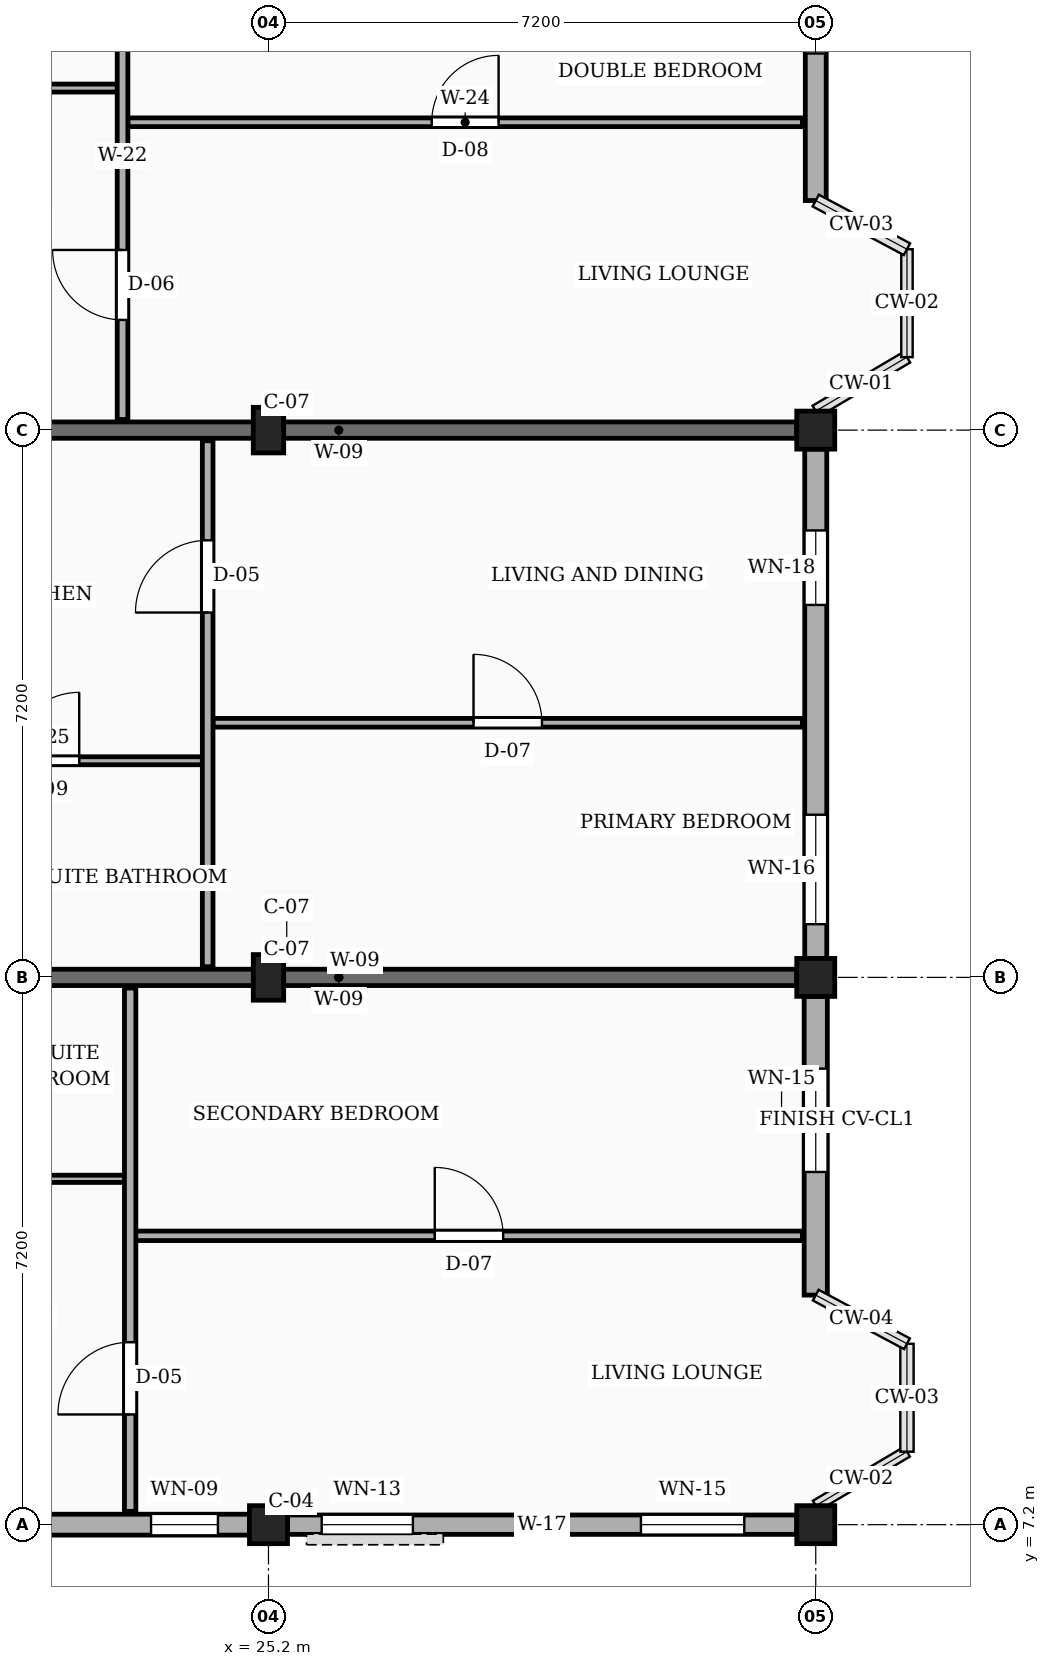
"""IFC4 building model, lengths in metres.
Left out: names, types, materials, properties, quantities, classifications, styles, units other than length and angle.
Written with IfcOpenShell. Run it as: python <this file> out.ifc"""

import sys

from ifc_helpers import new_model, si_unit, direction, frame, frame_2d, origin, origin_2d, place, context, subcontext, project, spatial, rectangle, extrude, element, fill, save


model = new_model("IFC4")
c1 = context("Model", 3, precision=1e-05, world=origin(), true_north=direction((0.0, 1.0)))
c2 = subcontext(c1, "Body", "Model", "MODEL_VIEW")
j1 = project(units=[si_unit("LENGTHUNIT", "METRE"), si_unit("PLANEANGLEUNIT", "RADIAN")], contexts=[c1])
p1 = place(None, origin())
s1 = spatial("IfcSite", under=j1, at=p1, CompositionType="ELEMENT")
p2 = place(p1, origin())
s2 = spatial("IfcBuilding", under=s1, at=p2, CompositionType="ELEMENT")
p3 = place(p2, frame((0.0, 0.0, 29.7)))
s3 = spatial("IfcBuildingStorey", under=s2, at=p3, CompositionType="ELEMENT", Elevation=29.7)
p4 = place(p3, frame((25.2, 7.2, 0.0), z_axis=(0.0, 0.0, 1.0), x_axis=(1.0, 0.0, 0.0)))
e1 = element("IfcColumn", 1, at=p4, inside=s3, PredefinedType="COLUMN", context=c2, shape_type="SweptSolid", body=[
    extrude(rectangle(XDim=0.5, YDim=0.5, at=origin_2d()), origin(), (0.0, 0.0, 1.0), 3.15),
])
for number, where, z_axis, x_axis in (
    (2, (25.2, 14.4, 0.0), (0.0, 0.0, 1.0), (1.0, 0.0, 0.0)),
    (3, (25.2, 21.6, 0.0), (0.0, 0.0, 1.0), (1.0, 0.0, 0.0)),
):
    element("IfcColumn", number, at=place(p3, frame(where, z_axis=z_axis, x_axis=x_axis)), inside=s3, PredefinedType="COLUMN", context=c2, shape_type="SweptSolid", body=[
        extrude(rectangle(XDim=0.4, YDim=0.6, at=origin_2d()), origin(), (0.0, 0.0, 1.0), 3.15),
    ])
for number, where, z_axis, x_axis in (
    (4, (32.4, 7.2, 0.0), (0.0, 0.0, 1.0), (1.0, 0.0, 0.0)),
    (5, (32.4, 14.4, 0.0), (0.0, 0.0, 1.0), (1.0, 0.0, 0.0)),
    (6, (32.4, 21.6, 0.0), (0.0, 0.0, 1.0), (1.0, 0.0, 0.0)),
):
    element("IfcColumn", number, at=place(p3, frame(where, z_axis=z_axis, x_axis=x_axis)), inside=s3, PredefinedType="COLUMN", context=c2, shape_type="SweptSolid", body=[
        extrude(rectangle(XDim=0.5, YDim=0.5, at=origin_2d()), origin(), (0.0, 0.0, 1.0), 3.15),
    ])
for number, where, z_axis, x_axis in (
    (7, (20.1, 14.4, 0.0), (0.0, 0.0, 1.0), (1.0, 0.0, 0.0)),
    (8, (20.1, 21.6, 0.0), (0.0, 0.0, 1.0), (1.0, 0.0, 0.0)),
):
    element("IfcWall", number, at=place(p3, frame(where, z_axis=z_axis, x_axis=x_axis)), inside=s3, PredefinedType="SOLIDWALL", context=c2, shape_type="SweptSolid", body=[
        extrude(rectangle(XDim=12.05, YDim=0.215, at=frame_2d((6.025, 0.0))), origin(), (0.0, 0.0, 1.0), 2.17),
    ])
p5 = place(p3, frame((18.25, 7.2, 0.0), z_axis=(0.0, 0.0, 1.0), x_axis=(1.0, 0.0, 0.0)))
e9 = element("IfcWall", 9, at=p5, inside=s3, PredefinedType="SOLIDWALL", context=c2, shape_type="SweptSolid", body=[
    extrude(rectangle(XDim=6.7, YDim=0.275, at=frame_2d((3.35, 0.0))), origin(), (0.0, 0.0, 1.0), 2.44),
])
p6 = place(p5, frame((0.515, 0.0, 0.78)))
e10 = element("IfcOpeningElement", 10, at=p6, cuts=e9, PredefinedType="OPENING", context=c2, shape_type="SweptSolid", body=[
    extrude(rectangle(XDim=0.96, YDim=1.26, at=frame_2d((0.48, 0.63))), frame((0.0, 0.147, 0.0), z_axis=(0.0, -1.0, 0.0), x_axis=(1.0, 0.0, 0.0)), (0.0, 0.0, 1.0), 0.295),
])
p7 = place(p5, frame((2.93, 0.0, 0.78)))
e11 = element("IfcOpeningElement", 11, at=p7, cuts=e9, PredefinedType="OPENING", context=c2, shape_type="SweptSolid", body=[
    extrude(rectangle(XDim=1.12, YDim=1.26, at=frame_2d((0.56, 0.63))), frame((0.0, 0.147, 0.0), z_axis=(0.0, -1.0, 0.0), x_axis=(1.0, 0.0, 0.0)), (0.0, 0.0, 1.0), 0.295),
])
p8 = place(p5, frame((5.405, 0.0, 0.78)))
e12 = element("IfcOpeningElement", 12, at=p8, cuts=e9, PredefinedType="OPENING", context=c2, shape_type="SweptSolid", body=[
    extrude(rectangle(XDim=0.88, YDim=1.26, at=frame_2d((0.44, 0.63))), frame((0.0, 0.147, 0.0), z_axis=(0.0, -1.0, 0.0), x_axis=(1.0, 0.0, 0.0)), (0.0, 0.0, 1.0), 0.295),
])
p9 = place(p3, frame((25.45, 7.2, 0.0), z_axis=(0.0, 0.0, 1.0), x_axis=(1.0, 0.0, 0.0)))
e13 = element("IfcWall", 13, at=p9, inside=s3, PredefinedType="SOLIDWALL", context=c2, shape_type="SweptSolid", body=[
    extrude(rectangle(XDim=6.7, YDim=0.255, at=frame_2d((3.35, 0.0))), origin(), (0.0, 0.0, 1.0), 2.44),
])
p10 = place(p9, frame((0.45, 0.0, 0.78)))
e14 = element("IfcOpeningElement", 14, at=p10, cuts=e13, PredefinedType="OPENING", context=c2, shape_type="SweptSolid", body=[
    extrude(rectangle(XDim=1.2, YDim=1.26, at=frame_2d((0.6, 0.63))), frame((0.0, 0.137, 0.0), z_axis=(0.0, -1.0, 0.0), x_axis=(1.0, 0.0, 0.0)), (0.0, 0.0, 1.0), 0.275),
])
p11 = place(p9, frame((4.65, 0.0, 0.78)))
e15 = element("IfcOpeningElement", 15, at=p11, cuts=e13, PredefinedType="OPENING", context=c2, shape_type="SweptSolid", body=[
    extrude(rectangle(XDim=1.36, YDim=1.26, at=frame_2d((0.68, 0.63))), frame((0.0, 0.137, 0.0), z_axis=(0.0, -1.0, 0.0), x_axis=(1.0, 0.0, 0.0)), (0.0, 0.0, 1.0), 0.275),
])
p12 = place(p3, frame((32.4, 10.22, 0.0), z_axis=(0.0, 0.0, 1.0), x_axis=(0.0, 1.0, 0.0)))
e16 = element("IfcWall", 16, at=p12, inside=s3, PredefinedType="SOLIDWALL", context=c2, shape_type="SweptSolid", body=[
    extrude(rectangle(XDim=3.93, YDim=0.305, at=frame_2d((1.965, 0.0))), origin(), (0.0, 0.0, 1.0), 2.44),
])
p13 = place(p12, frame((1.62, 0.0, 0.78)))
e17 = element("IfcOpeningElement", 17, at=p13, cuts=e16, PredefinedType="OPENING", context=c2, shape_type="SweptSolid", body=[
    extrude(rectangle(XDim=1.36, YDim=1.26, at=frame_2d((0.68, 0.63))), frame((0.0, 0.163, 0.0), z_axis=(0.0, -1.0, 0.0), x_axis=(1.0, 0.0, 0.0)), (0.0, 0.0, 1.0), 0.325),
])
p14 = place(p3, frame((32.4, 14.65, 0.0), z_axis=(0.0, 0.0, 1.0), x_axis=(0.0, 1.0, 0.0)))
e18 = element("IfcWall", 18, at=p14, inside=s3, PredefinedType="SOLIDWALL", context=c2, shape_type="SweptSolid", body=[
    extrude(rectangle(XDim=6.7, YDim=0.29, at=frame_2d((3.35, 0.0))), origin(), (0.0, 0.0, 1.0), 2.44),
])
p15 = place(p14, frame((0.45, 0.0, 0.78)))
e19 = element("IfcOpeningElement", 19, at=p15, cuts=e18, PredefinedType="OPENING", context=c2, shape_type="SweptSolid", body=[
    extrude(rectangle(XDim=1.44, YDim=1.26, at=frame_2d((0.72, 0.63))), frame((0.0, 0.155, 0.0), z_axis=(0.0, -1.0, 0.0), x_axis=(1.0, 0.0, 0.0)), (0.0, 0.0, 1.0), 0.31),
])
p16 = place(p14, frame((4.65, 0.0, 0.78)))
e20 = element("IfcOpeningElement", 20, at=p16, cuts=e18, PredefinedType="OPENING", context=c2, shape_type="SweptSolid", body=[
    extrude(rectangle(XDim=0.98, YDim=1.36, at=frame_2d((0.49, 0.68))), frame((0.0, 0.155, 0.0), z_axis=(0.0, -1.0, 0.0), x_axis=(1.0, 0.0, 0.0)), (0.0, 0.0, 1.0), 0.31),
])
p17 = place(p3, frame((32.4, 24.62, 0.0), z_axis=(0.0, 0.0, 1.0), x_axis=(0.0, 1.0, 0.0)))
e21 = element("IfcWall", 21, at=p17, inside=s3, PredefinedType="SOLIDWALL", context=c2, shape_type="SweptSolid", body=[
    extrude(rectangle(XDim=3.93, YDim=0.275, at=frame_2d((1.965, 0.0))), origin(), (0.0, 0.0, 1.0), 2.44),
])
p18 = place(p17, frame((1.935, 0.0, 0.78)))
e22 = element("IfcOpeningElement", 22, at=p18, cuts=e21, PredefinedType="OPENING", context=c2, shape_type="SweptSolid", body=[
    extrude(rectangle(XDim=0.98, YDim=1.36, at=frame_2d((0.49, 0.68))), frame((0.0, 0.147, 0.0), z_axis=(0.0, -1.0, 0.0), x_axis=(1.0, 0.0, 0.0)), (0.0, 0.0, 1.0), 0.295),
])
p19 = place(p3, frame((23.45, 11.0, 0.0), z_axis=(0.0, 0.0, 1.0), x_axis=(1.0, 0.0, 0.0)))
e23 = element("IfcWall", 23, at=p19, inside=s3, PredefinedType="PARTITIONING", context=c2, shape_type="SweptSolid", body=[
    extrude(rectangle(XDim=8.775, YDim=0.125, at=frame_2d((4.388, 0.0))), origin(), (0.0, 0.0, 1.0), 2.305),
])
p20 = place(p19, frame((3.938, 0.0, 0.0)))
e24 = element("IfcOpeningElement", 24, at=p20, cuts=e23, PredefinedType="OPENING", context=c2, shape_type="SweptSolid", body=[
    extrude(rectangle(XDim=0.9, YDim=2.1, at=frame_2d((0.45, 1.05))), frame((0.0, 0.073, 0.0), z_axis=(0.0, -1.0, 0.0), x_axis=(1.0, 0.0, 0.0)), (0.0, 0.0, 1.0), 0.145),
])
p21 = place(p3, frame((20.19, 11.75, 0.0), z_axis=(0.0, 0.0, 1.0), x_axis=(1.0, 0.0, 0.0)))
e25 = element("IfcWall", 25, at=p21, inside=s3, PredefinedType="PARTITIONING", context=c2, shape_type="SweptSolid", body=[
    extrude(rectangle(XDim=3.12, YDim=0.095, at=frame_2d((1.56, 0.0))), origin(), (0.0, 0.0, 1.0), 2.305),
])
p22 = place(p21, frame((1.11, 0.0, 0.0)))
e26 = element("IfcOpeningElement", 26, at=p22, cuts=e25, PredefinedType="OPENING", context=c2, shape_type="SweptSolid", body=[
    extrude(rectangle(XDim=0.9, YDim=2.05, at=frame_2d((0.45, 1.025))), frame((0.0, 0.058, 0.0), z_axis=(0.0, -1.0, 0.0), x_axis=(1.0, 0.0, 0.0)), (0.0, 0.0, 1.0), 0.115),
])
p23 = place(p3, frame((23.38, 7.375, 0.0), z_axis=(0.0, 0.0, 1.0), x_axis=(0.0, 1.0, 0.0)))
e27 = element("IfcWall", 27, at=p23, inside=s3, PredefinedType="PARTITIONING", context=c2, shape_type="SweptSolid", body=[
    extrude(rectangle(XDim=6.885, YDim=0.15, at=frame_2d((3.442, 0.0))), origin(), (0.0, 0.0, 1.0), 2.305),
])
p24 = place(p23, frame((1.275, 0.0, 0.0)))
e28 = element("IfcOpeningElement", 28, at=p24, cuts=e27, PredefinedType="OPENING", context=c2, shape_type="SweptSolid", body=[
    extrude(rectangle(XDim=0.95, YDim=2.1, at=frame_2d((0.475, 1.05))), frame((0.0, 0.085, 0.0), z_axis=(0.0, -1.0, 0.0), x_axis=(1.0, 0.0, 0.0)), (0.0, 0.0, 1.0), 0.17),
])
p25 = place(p3, frame((24.47, 17.75, 0.0), z_axis=(0.0, 0.0, 1.0), x_axis=(1.0, 0.0, 0.0)))
e29 = element("IfcWall", 29, at=p25, inside=s3, PredefinedType="PARTITIONING", context=c2, shape_type="SweptSolid", body=[
    extrude(rectangle(XDim=7.755, YDim=0.115, at=frame_2d((3.877, 0.0))), origin(), (0.0, 0.0, 1.0), 2.305),
])
p26 = place(p25, frame((3.427, 0.0, 0.0)))
e30 = element("IfcOpeningElement", 30, at=p26, cuts=e29, PredefinedType="OPENING", context=c2, shape_type="SweptSolid", body=[
    extrude(rectangle(XDim=0.9, YDim=2.1, at=frame_2d((0.45, 1.05))), frame((0.0, 0.067, 0.0), z_axis=(0.0, -1.0, 0.0), x_axis=(1.0, 0.0, 0.0)), (0.0, 0.0, 1.0), 0.135),
])
p27 = place(p3, frame((20.19, 17.25, 0.0), z_axis=(0.0, 0.0, 1.0), x_axis=(1.0, 0.0, 0.0)))
e31 = element("IfcWall", 31, at=p27, inside=s3, PredefinedType="PARTITIONING", context=c2, shape_type="SweptSolid", body=[
    extrude(rectangle(XDim=4.14, YDim=0.105, at=frame_2d((2.07, 0.0))), origin(), (0.0, 0.0, 1.0), 2.305),
])
p28 = place(p27, frame((1.62, 0.0, 0.0)))
e32 = element("IfcOpeningElement", 32, at=p28, cuts=e31, PredefinedType="OPENING", context=c2, shape_type="SweptSolid", body=[
    extrude(rectangle(XDim=0.9, YDim=2.05, at=frame_2d((0.45, 1.025))), frame((0.0, 0.062, 0.0), z_axis=(0.0, -1.0, 0.0), x_axis=(1.0, 0.0, 0.0)), (0.0, 0.0, 1.0), 0.125),
])
p29 = place(p3, frame((24.4, 14.54, 0.0), z_axis=(0.0, 0.0, 1.0), x_axis=(0.0, 1.0, 0.0)))
e33 = element("IfcWall", 33, at=p29, inside=s3, PredefinedType="PARTITIONING", context=c2, shape_type="SweptSolid", body=[
    extrude(rectangle(XDim=6.92, YDim=0.14, at=frame_2d((3.46, 0.0))), origin(), (0.0, 0.0, 1.0), 2.305),
])
p30 = place(p29, frame((4.66, 0.0, 0.0)))
e34 = element("IfcOpeningElement", 34, at=p30, cuts=e33, PredefinedType="OPENING", context=c2, shape_type="SweptSolid", body=[
    extrude(rectangle(XDim=0.95, YDim=2.1, at=frame_2d((0.475, 1.05))), frame((0.0, 0.08, 0.0), z_axis=(0.0, -1.0, 0.0), x_axis=(1.0, 0.0, 0.0)), (0.0, 0.0, 1.0), 0.16),
])
p31 = place(p3, frame((23.35, 25.65, 0.0), z_axis=(0.0, 0.0, 1.0), x_axis=(1.0, 0.0, 0.0)))
e35 = element("IfcWall", 35, at=p31, inside=s3, PredefinedType="PARTITIONING", context=c2, shape_type="SweptSolid", body=[
    extrude(rectangle(XDim=8.875, YDim=0.115, at=frame_2d((4.438, 0.0))), origin(), (0.0, 0.0, 1.0), 2.305),
])
p32 = place(p31, frame((3.998, 0.0, 0.0)))
e36 = element("IfcOpeningElement", 36, at=p32, cuts=e35, PredefinedType="OPENING", context=c2, shape_type="SweptSolid", body=[
    extrude(rectangle(XDim=0.88, YDim=2.08, at=frame_2d((0.44, 1.04))), frame((0.0, 0.067, 0.0), z_axis=(0.0, -1.0, 0.0), x_axis=(1.0, 0.0, 0.0)), (0.0, 0.0, 1.0), 0.135),
])
p33 = place(p3, frame((20.19, 26.1, 0.0), z_axis=(0.0, 0.0, 1.0), x_axis=(1.0, 0.0, 0.0)))
e37 = element("IfcWall", 37, at=p33, inside=s3, PredefinedType="PARTITIONING", context=c2, shape_type="SweptSolid", body=[
    extrude(rectangle(XDim=3.02, YDim=0.105, at=frame_2d((1.51, 0.0))), origin(), (0.0, 0.0, 1.0), 2.305),
])
p34 = place(p33, frame((1.075, 0.0, 0.0)))
e38 = element("IfcOpeningElement", 38, at=p34, cuts=e37, PredefinedType="OPENING", context=c2, shape_type="SweptSolid", body=[
    extrude(rectangle(XDim=0.87, YDim=2.05, at=frame_2d((0.435, 1.025))), frame((0.0, 0.062, 0.0), z_axis=(0.0, -1.0, 0.0), x_axis=(1.0, 0.0, 0.0)), (0.0, 0.0, 1.0), 0.125),
])
p35 = place(p3, frame((23.28, 21.74, 0.0), z_axis=(0.0, 0.0, 1.0), x_axis=(0.0, 1.0, 0.0)))
e39 = element("IfcWall", 39, at=p35, inside=s3, PredefinedType="PARTITIONING", context=c2, shape_type="SweptSolid", body=[
    extrude(rectangle(XDim=6.92, YDim=0.14, at=frame_2d((3.46, 0.0))), origin(), (0.0, 0.0, 1.0), 2.305),
])
p36 = place(p35, frame((1.31, 0.0, 0.0)))
e40 = element("IfcOpeningElement", 40, at=p36, cuts=e39, PredefinedType="OPENING", context=c2, shape_type="SweptSolid", body=[
    extrude(rectangle(XDim=0.92, YDim=2.1, at=frame_2d((0.46, 1.05))), frame((0.0, 0.08, 0.0), z_axis=(0.0, -1.0, 0.0), x_axis=(1.0, 0.0, 0.0)), (0.0, 0.0, 1.0), 0.16),
])
p37 = place(p8, origin())
e41 = element("IfcWindow", 41, at=p37, inside=s3, PartitioningType="SINGLE_PANEL", PredefinedType="WINDOW", context=c2, shape_type="SweptSolid", body=[
    extrude(rectangle(XDim=0.88, YDim=1.26, at=frame_2d((0.44, 0.63))), frame((0.0, 0.03, 0.0), z_axis=(0.0, -1.0, 0.0), x_axis=(1.0, 0.0, 0.0)), (0.0, 0.0, 1.0), 0.06),
])
fill(e12, e41)
p38 = place(p10, origin())
e42 = element("IfcWindow", 42, at=p38, inside=s3, PartitioningType="SINGLE_PANEL", PredefinedType="WINDOW", context=c2, shape_type="SweptSolid", body=[
    extrude(rectangle(XDim=1.2, YDim=1.26, at=frame_2d((0.6, 0.63))), frame((0.0, 0.03, 0.0), z_axis=(0.0, -1.0, 0.0), x_axis=(1.0, 0.0, 0.0)), (0.0, 0.0, 1.0), 0.06),
])
fill(e14, e42)
p39 = place(p11, origin())
e43 = element("IfcWindow", 43, at=p39, inside=s3, PartitioningType="SINGLE_PANEL", PredefinedType="WINDOW", context=c2, shape_type="SweptSolid", body=[
    extrude(rectangle(XDim=1.36, YDim=1.26, at=frame_2d((0.68, 0.63))), frame((0.0, 0.03, 0.0), z_axis=(0.0, -1.0, 0.0), x_axis=(1.0, 0.0, 0.0)), (0.0, 0.0, 1.0), 0.06),
])
fill(e15, e43)
p40 = place(p13, origin())
e44 = element("IfcWindow", 44, at=p40, inside=s3, PartitioningType="SINGLE_PANEL", PredefinedType="WINDOW", context=c2, shape_type="SweptSolid", body=[
    extrude(rectangle(XDim=1.36, YDim=1.26, at=frame_2d((0.68, 0.63))), frame((0.0, 0.03, 0.0), z_axis=(0.0, -1.0, 0.0), x_axis=(1.0, 0.0, 0.0)), (0.0, 0.0, 1.0), 0.06),
])
fill(e17, e44)
p41 = place(p15, origin())
e45 = element("IfcWindow", 45, at=p41, inside=s3, PartitioningType="SINGLE_PANEL", PredefinedType="WINDOW", context=c2, shape_type="SweptSolid", body=[
    extrude(rectangle(XDim=1.44, YDim=1.26, at=frame_2d((0.72, 0.63))), frame((0.0, 0.03, 0.0), z_axis=(0.0, -1.0, 0.0), x_axis=(1.0, 0.0, 0.0)), (0.0, 0.0, 1.0), 0.06),
])
fill(e19, e45)
p42 = place(p16, origin())
e46 = element("IfcWindow", 46, at=p42, inside=s3, PartitioningType="SINGLE_PANEL", PredefinedType="WINDOW", context=c2, shape_type="SweptSolid", body=[
    extrude(rectangle(XDim=0.98, YDim=1.36, at=frame_2d((0.49, 0.68))), frame((0.0, 0.03, 0.0), z_axis=(0.0, -1.0, 0.0), x_axis=(1.0, 0.0, 0.0)), (0.0, 0.0, 1.0), 0.06),
])
fill(e20, e46)
p43 = place(p18, origin())
e47 = element("IfcWindow", 47, at=p43, inside=s3, PartitioningType="SINGLE_PANEL", PredefinedType="WINDOW", context=c2, shape_type="SweptSolid", body=[
    extrude(rectangle(XDim=0.98, YDim=1.36, at=frame_2d((0.49, 0.68))), frame((0.0, 0.03, 0.0), z_axis=(0.0, -1.0, 0.0), x_axis=(1.0, 0.0, 0.0)), (0.0, 0.0, 1.0), 0.06),
])
fill(e22, e47)
p44 = place(p20, origin())
e48 = element("IfcDoor", 48, at=p44, inside=s3, OperationType="SINGLE_SWING_LEFT", PredefinedType="DOOR", context=c2, shape_type="SweptSolid", body=[
    extrude(rectangle(XDim=0.9, YDim=2.1, at=frame_2d((0.45, 1.05))), frame((0.0, 0.025, 0.0), z_axis=(0.0, -1.0, 0.0), x_axis=(1.0, 0.0, 0.0)), (0.0, 0.0, 1.0), 0.05),
])
fill(e24, e48)
p45 = place(p24, origin())
e49 = element("IfcDoor", 49, at=p45, inside=s3, OperationType="SINGLE_SWING_LEFT", PredefinedType="DOOR", context=c2, shape_type="SweptSolid", body=[
    extrude(rectangle(XDim=0.95, YDim=2.1, at=frame_2d((0.475, 1.05))), frame((0.0, 0.025, 0.0), z_axis=(0.0, -1.0, 0.0), x_axis=(1.0, 0.0, 0.0)), (0.0, 0.0, 1.0), 0.05),
])
fill(e28, e49)
p46 = place(p26, origin())
e50 = element("IfcDoor", 50, at=p46, inside=s3, OperationType="SINGLE_SWING_LEFT", PredefinedType="DOOR", context=c2, shape_type="SweptSolid", body=[
    extrude(rectangle(XDim=0.9, YDim=2.1, at=frame_2d((0.45, 1.05))), frame((0.0, 0.025, 0.0), z_axis=(0.0, -1.0, 0.0), x_axis=(1.0, 0.0, 0.0)), (0.0, 0.0, 1.0), 0.05),
])
fill(e30, e50)
p47 = place(p28, origin())
e51 = element("IfcDoor", 51, at=p47, inside=s3, OperationType="SINGLE_SWING_RIGHT", PredefinedType="DOOR", context=c2, shape_type="SweptSolid", body=[
    extrude(rectangle(XDim=0.9, YDim=2.05, at=frame_2d((0.45, 1.025))), frame((0.0, 0.025, 0.0), z_axis=(0.0, -1.0, 0.0), x_axis=(1.0, 0.0, 0.0)), (0.0, 0.0, 1.0), 0.05),
])
fill(e32, e51)
p48 = place(p30, origin())
e52 = element("IfcDoor", 52, at=p48, inside=s3, OperationType="SINGLE_SWING_LEFT", PredefinedType="DOOR", context=c2, shape_type="SweptSolid", body=[
    extrude(rectangle(XDim=0.95, YDim=2.1, at=frame_2d((0.475, 1.05))), frame((0.0, 0.025, 0.0), z_axis=(0.0, -1.0, 0.0), x_axis=(1.0, 0.0, 0.0)), (0.0, 0.0, 1.0), 0.05),
])
fill(e34, e52)
p49 = place(p32, origin())
e53 = element("IfcDoor", 53, at=p49, inside=s3, OperationType="SINGLE_SWING_RIGHT", PredefinedType="DOOR", context=c2, shape_type="SweptSolid", body=[
    extrude(rectangle(XDim=0.88, YDim=2.08, at=frame_2d((0.44, 1.04))), frame((0.0, 0.025, 0.0), z_axis=(0.0, -1.0, 0.0), x_axis=(1.0, 0.0, 0.0)), (0.0, 0.0, 1.0), 0.05),
])
fill(e36, e53)
p50 = place(p36, origin())
e54 = element("IfcDoor", 54, at=p50, inside=s3, OperationType="SINGLE_SWING_RIGHT", PredefinedType="DOOR", context=c2, shape_type="SweptSolid", body=[
    extrude(rectangle(XDim=0.92, YDim=2.1, at=frame_2d((0.46, 1.05))), frame((0.0, 0.025, 0.0), z_axis=(0.0, -1.0, 0.0), x_axis=(1.0, 0.0, 0.0)), (0.0, 0.0, 1.0), 0.05),
])
fill(e40, e54)
save(model, sys.argv[1])
